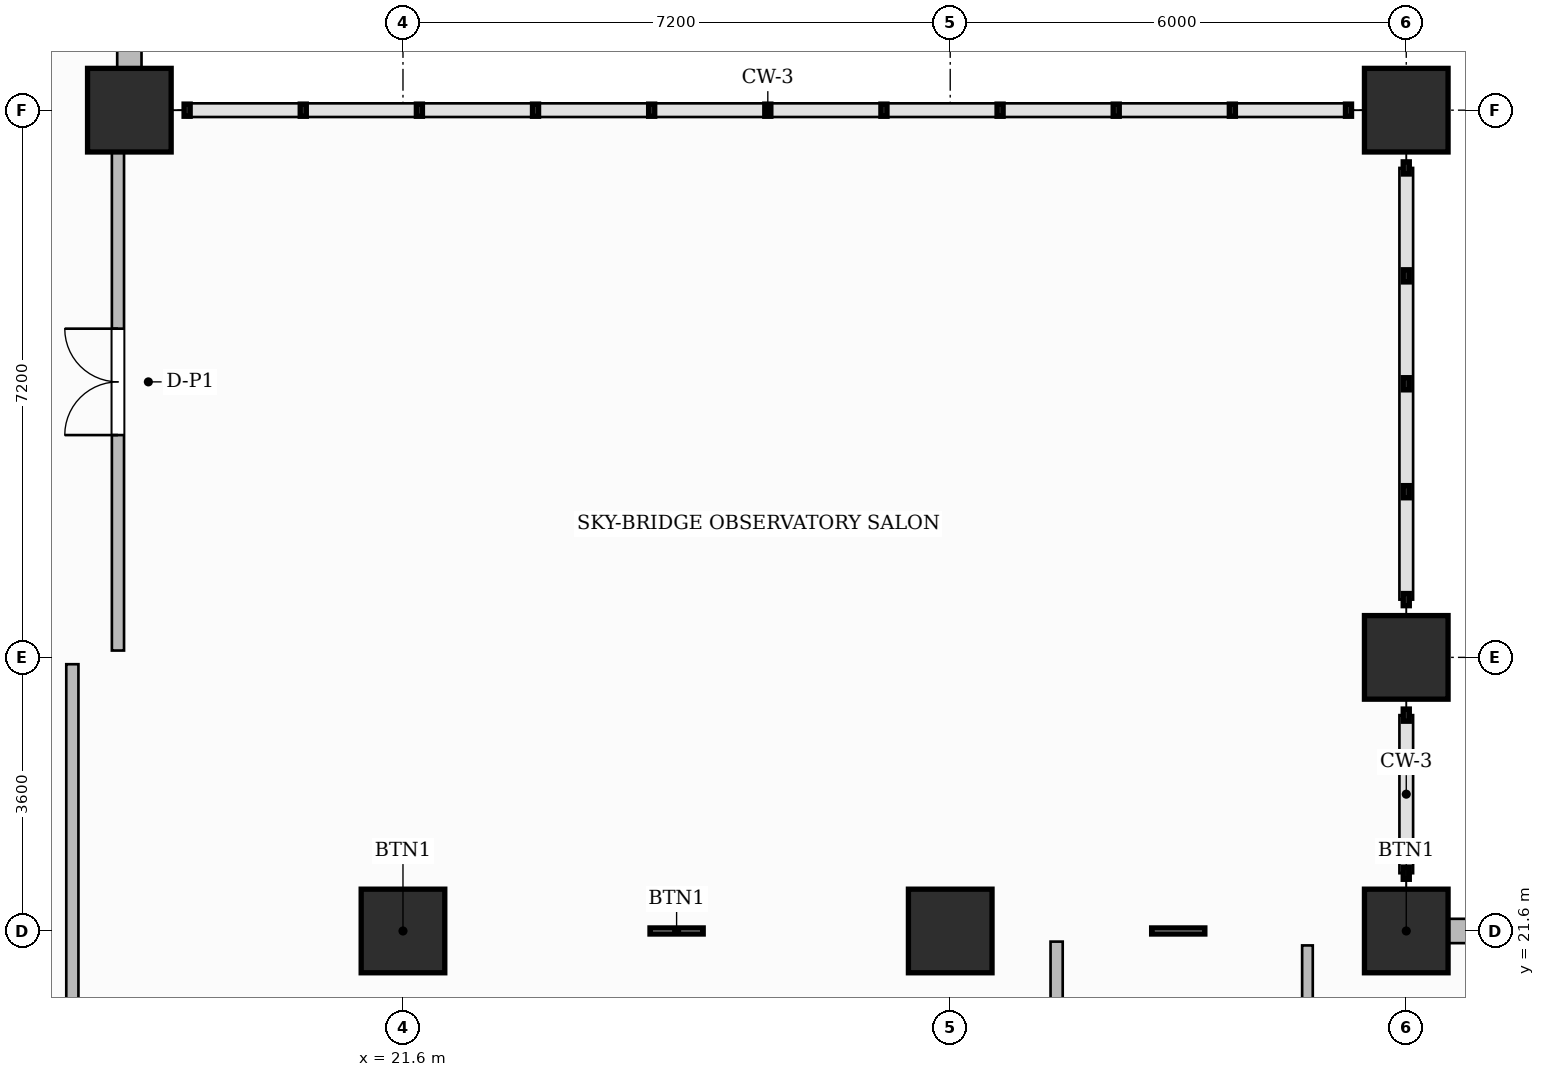
"""IFC4 building model, lengths in metres.
Left out: names, types, materials, properties, quantities, classifications, styles, units other than length and angle.
Written with IfcOpenShell. Run it as: python <this file> out.ifc"""

import sys

from ifc_helpers import new_model, si_unit, direction, frame, frame_2d, origin, origin_2d, place, context, subcontext, project, spatial, rectangle, extrude, source, transform, mapped, element, fill, save


model = new_model("IFC4")
c1 = context("Model", 3, precision=1e-05, world=origin(), true_north=direction((0.0, 1.0)))
c2 = subcontext(c1, "Body", "Model", "MODEL_VIEW")
j1 = project(units=[si_unit("LENGTHUNIT", "METRE"), si_unit("PLANEANGLEUNIT", "RADIAN")], contexts=[c1])
p1 = place(None, origin())
s1 = spatial("IfcSite", under=j1, at=p1, CompositionType="ELEMENT")
p2 = place(p1, origin())
s2 = spatial("IfcBuilding", under=s1, at=p2, CompositionType="ELEMENT")
p3 = place(p2, frame((0.0, 0.0, 69.4)))
s3 = spatial("IfcBuildingStorey", under=s2, at=p3, CompositionType="ELEMENT", Elevation=69.4)
m1 = source(origin(), c2, "Body", "SweptSolid", [
    extrude(rectangle(XDim=1.1, YDim=1.1, at=origin_2d()), origin(), (0.0, 0.0, 1.0), 3.7),
])
for number, where, z_axis, x_axis in (
    (1, (21.6, 21.6, 0.0), (0.0, 0.0, 1.0), (1.0, 0.0, 0.0)),
    (2, (28.8, 21.6, 0.0), (0.0, 0.0, 1.0), (1.0, 0.0, 0.0)),
    (3, (34.8, 21.6, 0.0), (0.0, 0.0, 1.0), (1.0, 0.0, 0.0)),
    (4, (34.8, 25.2, 0.0), (0.0, 0.0, 1.0), (1.0, 0.0, 0.0)),
    (5, (34.8, 32.4, 0.0), (0.0, 0.0, 1.0), (1.0, 0.0, 0.0)),
    (6, (18.0, 32.4, 0.0), (0.0, 0.0, 1.0), (1.0, 0.0, 0.0)),
):
    element("IfcColumn", number, at=place(p3, frame(where, z_axis=z_axis, x_axis=x_axis)), inside=s3, PredefinedType="COLUMN", context=c2, shape_type="MappedRepresentation", body=[
        mapped(m1, transform((0.0, 0.0, 0.0), scale=1.0)),
    ])
p4 = place(p3, frame((30.2, 12.16, 0.0), z_axis=(0.0, 0.0, 1.0), x_axis=(0.0, 1.0, 0.0)))
e7 = element("IfcWall", 7, at=p4, inside=s3, PredefinedType="PARTITIONING", context=c2, shape_type="SweptSolid", body=[
    extrude(rectangle(XDim=9.3, YDim=0.16, at=frame_2d((4.65, 0.0))), origin(), (0.0, 0.0, 1.0), 3.45),
])
p5 = place(p3, frame((33.5, 17.09, 0.0), z_axis=(0.0, 0.0, 1.0), x_axis=(0.0, 1.0, 0.0)))
e8 = element("IfcWall", 8, at=p5, inside=s3, PredefinedType="PARTITIONING", context=c2, shape_type="SweptSolid", body=[
    extrude(rectangle(XDim=4.32, YDim=0.14, at=frame_2d((2.16, 0.0))), origin(), (0.0, 0.0, 1.0), 3.45),
])
p6 = place(p3, frame((17.25, 12.16, 0.0), z_axis=(0.0, 0.0, 1.0), x_axis=(0.0, 1.0, 0.0)))
e9 = element("IfcWall", 9, at=p6, inside=s3, PredefinedType="PARTITIONING", context=c2, shape_type="SweptSolid", body=[
    extrude(rectangle(XDim=12.95, YDim=0.16, at=frame_2d((6.475, 0.0))), origin(), (0.0, 0.0, 1.0), 3.45),
])
p7 = place(p3, frame((17.85, 25.29, 0.0), z_axis=(0.0, 0.0, 1.0), x_axis=(0.0, 1.0, 0.0)))
e10 = element("IfcWall", 10, at=p7, inside=s3, PredefinedType="PARTITIONING", context=c2, shape_type="SweptSolid", body=[
    extrude(rectangle(XDim=6.92, YDim=0.16, at=frame_2d((3.46, 0.0))), origin(), (0.0, 0.0, 1.0), 3.45),
])
p8 = place(p7, frame((2.835, 0.0, 0.0)))
e11 = element("IfcOpeningElement", 11, at=p8, cuts=e10, PredefinedType="OPENING", context=c2, shape_type="SweptSolid", body=[
    extrude(rectangle(XDim=1.4, YDim=2.35, at=frame_2d((0.7, 1.175))), frame((0.0, 0.09, 0.0), z_axis=(0.0, -1.0, 0.0), x_axis=(1.0, 0.0, 0.0)), (0.0, 0.0, 1.0), 0.18),
])
p9 = place(p3, frame((34.8, 21.6, 0.0), z_axis=(0.0, 0.0, 1.0), x_axis=(1.0, 0.0, 0.0)))
e12 = element("IfcWall", 12, at=p9, inside=s3, PredefinedType="SOLIDWALL", context=c2, shape_type="SweptSolid", body=[
    extrude(rectangle(XDim=22.8, YDim=0.32, at=frame_2d((11.4, 0.0))), origin(), (0.0, 0.0, 1.0), 2.885),
])
p10 = place(p9, frame((1.796, 0.0, 0.8)))
e13 = element("IfcOpeningElement", 13, at=p10, cuts=e12, PredefinedType="OPENING", context=c2, shape_type="SweptSolid", body=[
    extrude(rectangle(XDim=1.8, YDim=1.85, at=frame_2d((0.9, 0.925))), frame((0.0, 0.17, 0.0), z_axis=(0.0, -1.0, 0.0), x_axis=(1.0, 0.0, 0.0)), (0.0, 0.0, 1.0), 0.34),
])
p11 = place(p9, frame((4.929, 0.0, 0.8)))
e14 = element("IfcOpeningElement", 14, at=p11, cuts=e12, PredefinedType="OPENING", context=c2, shape_type="SweptSolid", body=[
    extrude(rectangle(XDim=1.15, YDim=1.8, at=frame_2d((0.575, 0.9))), frame((0.0, 0.17, 0.0), z_axis=(0.0, -1.0, 0.0), x_axis=(1.0, 0.0, 0.0)), (0.0, 0.0, 1.0), 0.34),
])
p12 = place(p9, frame((8.321, 0.0, 0.8)))
e15 = element("IfcOpeningElement", 15, at=p12, cuts=e12, PredefinedType="OPENING", context=c2, shape_type="SweptSolid", body=[
    extrude(rectangle(XDim=0.95, YDim=1.75, at=frame_2d((0.475, 0.875))), frame((0.0, 0.17, 0.0), z_axis=(0.0, -1.0, 0.0), x_axis=(1.0, 0.0, 0.0)), (0.0, 0.0, 1.0), 0.34),
])
p13 = place(p9, frame((11.004, 0.0, 0.8)))
e16 = element("IfcOpeningElement", 16, at=p13, cuts=e12, PredefinedType="OPENING", context=c2, shape_type="SweptSolid", body=[
    extrude(rectangle(XDim=1.8, YDim=1.85, at=frame_2d((0.9, 0.925))), frame((0.0, 0.17, 0.0), z_axis=(0.0, -1.0, 0.0), x_axis=(1.0, 0.0, 0.0)), (0.0, 0.0, 1.0), 0.34),
])
p14 = place(p9, frame((16.475, 0.0, 0.8)))
e17 = element("IfcOpeningElement", 17, at=p14, cuts=e12, PredefinedType="OPENING", context=c2, shape_type="SweptSolid", body=[
    extrude(rectangle(XDim=1.8, YDim=1.85, at=frame_2d((0.9, 0.925))), frame((0.0, 0.17, 0.0), z_axis=(0.0, -1.0, 0.0), x_axis=(1.0, 0.0, 0.0)), (0.0, 0.0, 1.0), 0.34),
])
p15 = place(p9, frame((19.525, 0.0, 0.8)))
e18 = element("IfcOpeningElement", 18, at=p15, cuts=e12, PredefinedType="OPENING", context=c2, shape_type="SweptSolid", body=[
    extrude(rectangle(XDim=1.8, YDim=1.85, at=frame_2d((0.9, 0.925))), frame((0.0, 0.17, 0.0), z_axis=(0.0, -1.0, 0.0), x_axis=(1.0, 0.0, 0.0)), (0.0, 0.0, 1.0), 0.34),
])
p16 = place(p3, frame((18.0, 32.4, 0.0), z_axis=(0.0, 0.0, 1.0), x_axis=(0.0, 1.0, 0.0)))
e19 = element("IfcWall", 19, at=p16, inside=s3, PredefinedType="SOLIDWALL", context=c2, shape_type="SweptSolid", body=[
    extrude(rectangle(XDim=14.35, YDim=0.32, at=frame_2d((7.175, 0.0))), origin(), (0.0, 0.0, 1.0), 3.45),
])
p17 = place(p16, frame((0.85, 0.0, 0.0)))
e20 = element("IfcOpeningElement", 20, at=p17, cuts=e19, PredefinedType="OPENING", context=c2, shape_type="SweptSolid", body=[
    extrude(rectangle(XDim=1.2, YDim=2.2, at=frame_2d((0.6, 1.1))), frame((0.0, 0.17, 0.0), z_axis=(0.0, -1.0, 0.0), x_axis=(1.0, 0.0, 0.0)), (0.0, 0.0, 1.0), 0.34),
])
p18 = place(p16, frame((3.475, 0.0, 0.8)))
e21 = element("IfcOpeningElement", 21, at=p18, cuts=e19, PredefinedType="OPENING", context=c2, shape_type="SweptSolid", body=[
    extrude(rectangle(XDim=1.8, YDim=1.85, at=frame_2d((0.9, 0.925))), frame((0.0, 0.17, 0.0), z_axis=(0.0, -1.0, 0.0), x_axis=(1.0, 0.0, 0.0)), (0.0, 0.0, 1.0), 0.34),
])
p19 = place(p16, frame((8.525, 0.0, 0.8)))
e22 = element("IfcOpeningElement", 22, at=p19, cuts=e19, PredefinedType="OPENING", context=c2, shape_type="SweptSolid", body=[
    extrude(rectangle(XDim=1.8, YDim=1.85, at=frame_2d((0.9, 0.925))), frame((0.0, 0.17, 0.0), z_axis=(0.0, -1.0, 0.0), x_axis=(1.0, 0.0, 0.0)), (0.0, 0.0, 1.0), 0.34),
])
p20 = place(p16, frame((11.275, 0.0, 0.8)))
e23 = element("IfcOpeningElement", 23, at=p20, cuts=e19, PredefinedType="OPENING", context=c2, shape_type="SweptSolid", body=[
    extrude(rectangle(XDim=1.8, YDim=1.85, at=frame_2d((0.9, 0.925))), frame((0.0, 0.17, 0.0), z_axis=(0.0, -1.0, 0.0), x_axis=(1.0, 0.0, 0.0)), (0.0, 0.0, 1.0), 0.34),
])
m2 = source(origin(), c2, "Body", "SweptSolid", [
    extrude(rectangle(XDim=1.4, YDim=2.35, at=frame_2d((0.7, 1.175))), frame((0.0, 0.025, 0.0), z_axis=(0.0, -1.0, 0.0), x_axis=(1.0, 0.0, 0.0)), (0.0, 0.0, 1.0), 0.05),
])
p21 = place(p8, origin())
e24 = element("IfcDoor", 24, at=p21, inside=s3, OperationType="DOUBLE_DOOR_SINGLE_SWING", PredefinedType="DOOR", context=c2, shape_type="MappedRepresentation", body=[
    mapped(m2, transform((0.0, 0.0, 0.0), scale=1.0)),
])
fill(e11, e24)
save(model, sys.argv[1])
